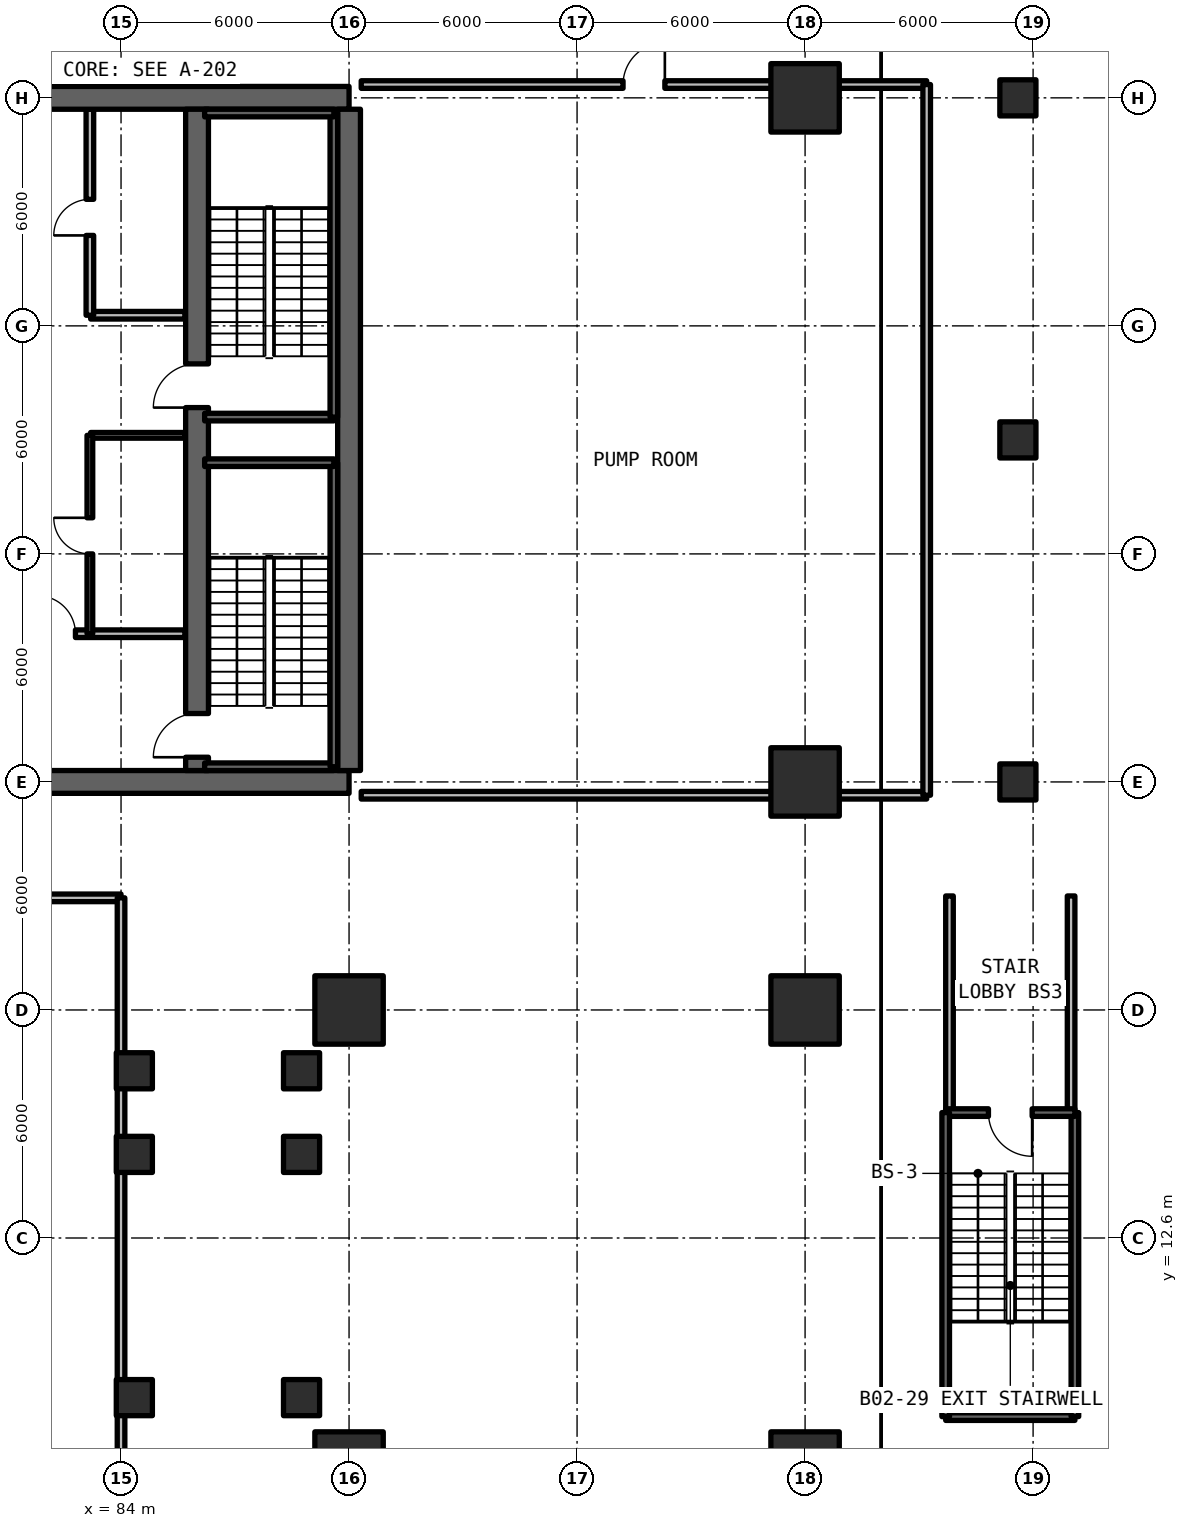
"""IFC4 building model, lengths in metres.
Left out: names, types, materials, properties, quantities, classifications, styles, units other than length and angle.
Written with IfcOpenShell. Run it as: python <this file> out.ifc"""

import sys

from ifc_helpers import new_model, si_unit, direction, frame, frame_2d, origin, origin_2d, place, context, subcontext, project, spatial, rectangle, extrude, element, fill, save


model = new_model("IFC4")
c1 = context("Model", 3, precision=1e-05, world=origin(), true_north=direction((0.0, 1.0)))
c2 = subcontext(c1, "Body", "Model", "MODEL_VIEW")
j1 = project(units=[si_unit("LENGTHUNIT", "METRE"), si_unit("PLANEANGLEUNIT", "RADIAN")], contexts=[c1])
p1 = place(None, origin())
s1 = spatial("IfcSite", under=j1, at=p1, CompositionType="ELEMENT")
p2 = place(p1, origin())
s2 = spatial("IfcBuilding", under=s1, at=p2, CompositionType="ELEMENT")
p3 = place(p2, frame((0.0, 0.0, -9.24)))
s3 = spatial("IfcBuildingStorey", under=s2, at=p3, CompositionType="ELEMENT", Elevation=-9.24)
for number, where, z_axis, x_axis in (
    (1, (78.0, 24.6, 0.0), (0.0, 0.0, 1.0), (1.0, 0.0, 0.0)),
    (2, (90.0, 42.6, 0.0), (0.0, 0.0, 1.0), (-1.0, 0.0, 0.0)),
):
    element("IfcWall", number, at=place(p3, frame(where, z_axis=z_axis, x_axis=x_axis)), inside=s3, PredefinedType="SHEAR", context=c2, shape_type="SweptSolid", body=[
        extrude(rectangle(XDim=12.0, YDim=0.6, at=frame_2d((6.0, 0.0))), origin(), (0.0, 0.0, 1.0), 4.62),
    ])
p4 = place(p3, frame((90.0, 24.9, 0.0), z_axis=(0.0, 0.0, 1.0), x_axis=(0.0, 1.0, 0.0)))
e3 = element("IfcWall", 3, at=p4, inside=s3, PredefinedType="SHEAR", context=c2, shape_type="SweptSolid", body=[
    extrude(rectangle(XDim=17.4, YDim=0.6, at=frame_2d((8.7, 0.0))), origin(), (0.0, 0.0, 1.0), 4.62),
])
p5 = place(p3, frame((86.0, 24.9, 0.0), z_axis=(0.0, 0.0, 1.0), x_axis=(0.0, 1.0, 0.0)))
e4 = element("IfcWall", 4, at=p5, inside=s3, PredefinedType="SHEAR", context=c2, shape_type="SweptSolid", body=[
    extrude(rectangle(XDim=17.4, YDim=0.6, at=frame_2d((8.7, 0.0))), origin(), (0.0, 0.0, 1.0), 4.62),
])
p6 = place(p5, frame((0.35, 0.0, 0.0)))
e5 = element("IfcOpeningElement", 5, at=p6, cuts=e4, PredefinedType="OPENING", context=c2, shape_type="SweptSolid", body=[
    extrude(rectangle(XDim=1.15, YDim=2.15, at=frame_2d((0.575, 1.075))), frame((0.0, 0.31, 0.0), z_axis=(0.0, -1.0, 0.0), x_axis=(1.0, 0.0, 0.0)), (0.0, 0.0, 1.0), 0.62),
])
p7 = place(p5, frame((9.55, 0.0, 0.0)))
e6 = element("IfcOpeningElement", 6, at=p7, cuts=e4, PredefinedType="OPENING", context=c2, shape_type="SweptSolid", body=[
    extrude(rectangle(XDim=1.15, YDim=2.15, at=frame_2d((0.575, 1.075))), frame((0.0, 0.31, 0.0), z_axis=(0.0, -1.0, 0.0), x_axis=(1.0, 0.0, 0.0)), (0.0, 0.0, 1.0), 0.62),
])
for number, where, z_axis, x_axis in (
    (7, (90.0, 6.6, 0.0), (0.0, 0.0, 1.0), (1.0, 0.0, 0.0)),
    (8, (102.0, 6.6, 0.0), (0.0, 0.0, 1.0), (1.0, 0.0, 0.0)),
    (9, (102.0, 24.6, 0.0), (0.0, 0.0, 1.0), (1.0, 0.0, 0.0)),
    (10, (102.0, 42.6, 0.0), (0.0, 0.0, 1.0), (1.0, 0.0, 0.0)),
    (11, (90.0, 18.6, 0.0), (0.0, 0.0, 1.0), (1.0, 0.0, 0.0)),
    (12, (102.0, 18.6, 0.0), (0.0, 0.0, 1.0), (1.0, 0.0, 0.0)),
):
    element("IfcColumn", number, at=place(p3, frame(where, z_axis=z_axis, x_axis=x_axis)), inside=s3, PredefinedType="COLUMN", context=c2, shape_type="SweptSolid", body=[
        extrude(rectangle(XDim=1.8, YDim=1.8, at=origin_2d()), origin(), (0.0, 0.0, 1.0), 4.62),
    ])
for number, where, z_axis, x_axis in (
    (13, (107.6, 24.6, 0.0), (0.0, 0.0, 1.0), (1.0, 0.0, 0.0)),
    (14, (107.6, 42.6, 0.0), (0.0, 0.0, 1.0), (1.0, 0.0, 0.0)),
    (15, (107.6, 33.6, 0.0), (0.0, 0.0, 1.0), (1.0, 0.0, 0.0)),
    (16, (84.35, 14.8, 0.0), (0.0, 0.0, 1.0), (1.0, 0.0, 0.0)),
    (17, (88.75, 14.8, 0.0), (0.0, 0.0, 1.0), (1.0, 0.0, 0.0)),
    (18, (84.35, 8.4, 0.0), (0.0, 0.0, 1.0), (1.0, 0.0, 0.0)),
    (19, (88.75, 8.4, 0.0), (0.0, 0.0, 1.0), (1.0, 0.0, 0.0)),
    (20, (88.75, 17.0, 0.0), (0.0, 0.0, 1.0), (1.0, 0.0, 0.0)),
    (21, (84.35, 17.0, 0.0), (0.0, 0.0, 1.0), (1.0, 0.0, 0.0)),
):
    element("IfcColumn", number, at=place(p3, frame(where, z_axis=z_axis, x_axis=x_axis)), inside=s3, PredefinedType="COLUMN", context=c2, shape_type="SweptSolid", body=[
        extrude(rectangle(XDim=0.95, YDim=0.95, at=origin_2d()), origin(), (0.0, 0.0, 1.0), 4.62),
    ])
p8 = place(p3, frame((78.32, 28.5, 0.0), z_axis=(0.0, 0.0, 1.0), x_axis=(1.0, 0.0, 0.0)))
e22 = element("IfcWall", 22, at=p8, inside=s3, PredefinedType="SOLIDWALL", context=c2, shape_type="SweptSolid", body=[
    extrude(rectangle(XDim=7.36, YDim=0.2, at=frame_2d((3.68, 0.0))), origin(), (0.0, 0.0, 1.0), 3.54),
])
p9 = place(p8, frame((3.48, 0.0, 0.0)))
e23 = element("IfcOpeningElement", 23, at=p9, cuts=e22, PredefinedType="OPENING", context=c2, shape_type="SweptSolid", body=[
    extrude(rectangle(XDim=1.0, YDim=2.15, at=frame_2d((0.5, 1.075))), frame((0.0, 0.11, 0.0), z_axis=(0.0, -1.0, 0.0), x_axis=(1.0, 0.0, 0.0)), (0.0, 0.0, 1.0), 0.22),
])
p10 = place(p3, frame((83.2, 33.72, 0.0), z_axis=(0.0, 0.0, 1.0), x_axis=(1.0, 0.0, 0.0)))
e24 = element("IfcWall", 24, at=p10, inside=s3, PredefinedType="SOLIDWALL", context=c2, shape_type="SweptSolid", body=[
    extrude(rectangle(XDim=2.48, YDim=0.15, at=frame_2d((1.24, 0.0))), origin(), (0.0, 0.0, 1.0), 3.54),
])
p11 = place(p3, frame((83.18, 28.5, 0.0), z_axis=(0.0, 0.0, 1.0), x_axis=(0.0, 1.0, 0.0)))
e25 = element("IfcWall", 25, at=p11, inside=s3, PredefinedType="SOLIDWALL", context=c2, shape_type="SweptSolid", body=[
    extrude(rectangle(XDim=5.22, YDim=0.15, at=frame_2d((2.61, 0.0))), origin(), (0.0, 0.0, 1.0), 3.54),
])
p12 = place(p11, frame((2.1, 0.0, 0.0)))
e26 = element("IfcOpeningElement", 26, at=p12, cuts=e25, PredefinedType="OPENING", context=c2, shape_type="SweptSolid", body=[
    extrude(rectangle(XDim=0.95, YDim=2.15, at=frame_2d((0.475, 1.075))), frame((0.0, 0.085, 0.0), z_axis=(0.0, -1.0, 0.0), x_axis=(1.0, 0.0, 0.0)), (0.0, 0.0, 1.0), 0.17),
])
p13 = place(p3, frame((83.2, 36.88, 0.0), z_axis=(0.0, 0.0, 1.0), x_axis=(1.0, 0.0, 0.0)))
e27 = element("IfcWall", 27, at=p13, inside=s3, PredefinedType="SOLIDWALL", context=c2, shape_type="SweptSolid", body=[
    extrude(rectangle(XDim=2.48, YDim=0.2, at=frame_2d((1.24, 0.0))), origin(), (0.0, 0.0, 1.0), 3.54),
])
p14 = place(p3, frame((83.18, 36.88, 0.0), z_axis=(0.0, 0.0, 1.0), x_axis=(0.0, 1.0, 0.0)))
e28 = element("IfcWall", 28, at=p14, inside=s3, PredefinedType="SOLIDWALL", context=c2, shape_type="SweptSolid", body=[
    extrude(rectangle(XDim=5.42, YDim=0.2, at=frame_2d((2.71, 0.0))), origin(), (0.0, 0.0, 1.0), 3.54),
])
p15 = place(p14, frame((2.1, 0.0, 0.0)))
e29 = element("IfcOpeningElement", 29, at=p15, cuts=e28, PredefinedType="OPENING", context=c2, shape_type="SweptSolid", body=[
    extrude(rectangle(XDim=0.95, YDim=2.15, at=frame_2d((0.475, 1.075))), frame((0.0, 0.11, 0.0), z_axis=(0.0, -1.0, 0.0), x_axis=(1.0, 0.0, 0.0)), (0.0, 0.0, 1.0), 0.22),
])
for number, where, z_axis, x_axis in (
    (30, (105.8, 15.9, 0.0), (0.0, 0.0, 1.0), (0.0, 1.0, 0.0)),
    (31, (109.0, 15.9, 0.0), (0.0, 0.0, 1.0), (0.0, 1.0, 0.0)),
):
    element("IfcWall", number, at=place(p3, frame(where, z_axis=z_axis, x_axis=x_axis)), inside=s3, PredefinedType="SOLIDWALL", context=c2, shape_type="SweptSolid", body=[
        extrude(rectangle(XDim=5.7, YDim=0.2, at=frame_2d((2.85, 0.0))), origin(), (0.0, 0.0, 1.0), 3.54),
    ])
p16 = place(p3, frame((30.2, 21.55, 0.0), z_axis=(0.0, 0.0, 1.0), x_axis=(1.0, 0.0, 0.0)))
e32 = element("IfcWall", 32, at=p16, inside=s3, PredefinedType="SOLIDWALL", context=c2, shape_type="SweptSolid", body=[
    extrude(rectangle(XDim=53.8, YDim=0.2, at=frame_2d((26.9, 0.0))), origin(), (0.0, 0.0, 1.0), 3.54),
])
p17 = place(p16, frame((26.45, 0.0, 0.0)))
e33 = element("IfcOpeningElement", 33, at=p17, cuts=e32, PredefinedType="OPENING", context=c2, shape_type="SweptSolid", body=[
    extrude(rectangle(XDim=1.1, YDim=2.15, at=frame_2d((0.55, 1.075))), frame((0.0, 0.11, 0.0), z_axis=(0.0, -1.0, 0.0), x_axis=(1.0, 0.0, 0.0)), (0.0, 0.0, 1.0), 0.22),
])
p18 = place(p3, frame((84.0, 0.45, 0.0), z_axis=(0.0, 0.0, 1.0), x_axis=(0.0, 1.0, 0.0)))
e34 = element("IfcWall", 34, at=p18, inside=s3, PredefinedType="SOLIDWALL", context=c2, shape_type="SweptSolid", body=[
    extrude(rectangle(XDim=21.1, YDim=0.2, at=frame_2d((10.55, 0.0))), origin(), (0.0, 0.0, 1.0), 3.54),
])
p19 = place(p3, frame((90.32, 24.25, 0.0), z_axis=(0.0, 0.0, 1.0), x_axis=(1.0, 0.0, 0.0)))
e35 = element("IfcWall", 35, at=p19, inside=s3, PredefinedType="SOLIDWALL", context=c2, shape_type="SweptSolid", body=[
    extrude(rectangle(XDim=14.88, YDim=0.2, at=frame_2d((7.44, 0.0))), origin(), (0.0, 0.0, 1.0), 3.54),
])
p20 = place(p3, frame((90.32, 42.95, 0.0), z_axis=(0.0, 0.0, 1.0), x_axis=(1.0, 0.0, 0.0)))
e36 = element("IfcWall", 36, at=p20, inside=s3, PredefinedType="SOLIDWALL", context=c2, shape_type="SweptSolid", body=[
    extrude(rectangle(XDim=14.88, YDim=0.2, at=frame_2d((7.44, 0.0))), origin(), (0.0, 0.0, 1.0), 3.54),
])
p21 = place(p20, frame((6.89, 0.0, 0.0)))
e37 = element("IfcOpeningElement", 37, at=p21, cuts=e36, PredefinedType="OPENING", context=c2, shape_type="SweptSolid", body=[
    extrude(rectangle(XDim=1.1, YDim=2.15, at=frame_2d((0.55, 1.075))), frame((0.0, 0.11, 0.0), z_axis=(0.0, -1.0, 0.0), x_axis=(1.0, 0.0, 0.0)), (0.0, 0.0, 1.0), 0.22),
])
p22 = place(p3, frame((105.2, 24.25, 0.0), z_axis=(0.0, 0.0, 1.0), x_axis=(0.0, 1.0, 0.0)))
e38 = element("IfcWall", 38, at=p22, inside=s3, PredefinedType="SOLIDWALL", context=c2, shape_type="SweptSolid", body=[
    extrude(rectangle(XDim=18.7, YDim=0.2, at=frame_2d((9.35, 0.0))), origin(), (0.0, 0.0, 1.0), 3.54),
])
p23 = place(p3, frame((86.2, 25.0, 0.0), z_axis=(0.0, 0.0, 1.0), x_axis=(1.0, 0.0, 0.0)))
e39 = element("IfcWall", 39, at=p23, inside=s3, PredefinedType="SOLIDWALL", context=c2, shape_type="SweptSolid", body=[
    extrude(rectangle(XDim=3.4, YDim=0.2, at=frame_2d((1.7, 0.0))), origin(), (0.0, 0.0, 1.0), 4.62),
])
p24 = place(p3, frame((89.6, 25.0, 0.0), z_axis=(0.0, 0.0, 1.0), x_axis=(0.0, 1.0, 0.0)))
e40 = element("IfcWall", 40, at=p24, inside=s3, PredefinedType="SOLIDWALL", context=c2, shape_type="SweptSolid", body=[
    extrude(rectangle(XDim=8.0, YDim=0.2, at=frame_2d((4.0, 0.0))), origin(), (0.0, 0.0, 1.0), 4.62),
])
for number, where, z_axis, x_axis in (
    (41, (89.6, 33.0, 0.0), (0.0, 0.0, 1.0), (-1.0, 0.0, 0.0)),
    (42, (86.2, 34.2, 0.0), (0.0, 0.0, 1.0), (1.0, 0.0, 0.0)),
):
    element("IfcWall", number, at=place(p3, frame(where, z_axis=z_axis, x_axis=x_axis)), inside=s3, PredefinedType="SOLIDWALL", context=c2, shape_type="SweptSolid", body=[
        extrude(rectangle(XDim=3.4, YDim=0.2, at=frame_2d((1.7, 0.0))), origin(), (0.0, 0.0, 1.0), 4.62),
    ])
p25 = place(p3, frame((89.6, 34.2, 0.0), z_axis=(0.0, 0.0, 1.0), x_axis=(0.0, 1.0, 0.0)))
e43 = element("IfcWall", 43, at=p25, inside=s3, PredefinedType="SOLIDWALL", context=c2, shape_type="SweptSolid", body=[
    extrude(rectangle(XDim=8.0, YDim=0.2, at=frame_2d((4.0, 0.0))), origin(), (0.0, 0.0, 1.0), 4.62),
])
for number, where, z_axis, x_axis in (
    (44, (89.6, 42.2, 0.0), (0.0, 0.0, 1.0), (-1.0, 0.0, 0.0)),
    (45, (105.7, 7.9, 0.0), (0.0, 0.0, 1.0), (1.0, 0.0, 0.0)),
):
    element("IfcWall", number, at=place(p3, frame(where, z_axis=z_axis, x_axis=x_axis)), inside=s3, PredefinedType="SOLIDWALL", context=c2, shape_type="SweptSolid", body=[
        extrude(rectangle(XDim=3.4, YDim=0.2, at=frame_2d((1.7, 0.0))), origin(), (0.0, 0.0, 1.0), 4.62),
    ])
p26 = place(p3, frame((109.1, 7.9, 0.0), z_axis=(0.0, 0.0, 1.0), x_axis=(0.0, 1.0, 0.0)))
e46 = element("IfcWall", 46, at=p26, inside=s3, PredefinedType="SOLIDWALL", context=c2, shape_type="SweptSolid", body=[
    extrude(rectangle(XDim=8.0, YDim=0.2, at=frame_2d((4.0, 0.0))), origin(), (0.0, 0.0, 1.0), 4.62),
])
p27 = place(p3, frame((109.1, 15.9, 0.0), z_axis=(0.0, 0.0, 1.0), x_axis=(-1.0, 0.0, 0.0)))
e47 = element("IfcWall", 47, at=p27, inside=s3, PredefinedType="SOLIDWALL", context=c2, shape_type="SweptSolid", body=[
    extrude(rectangle(XDim=3.4, YDim=0.2, at=frame_2d((1.7, 0.0))), origin(), (0.0, 0.0, 1.0), 4.62),
])
p28 = place(p27, frame((1.125, 0.0, 0.0)))
e48 = element("IfcOpeningElement", 48, at=p28, cuts=e47, PredefinedType="OPENING", context=c2, shape_type="SweptSolid", body=[
    extrude(rectangle(XDim=1.15, YDim=2.15, at=frame_2d((0.575, 1.075))), frame((0.0, 0.11, 0.0), z_axis=(0.0, -1.0, 0.0), x_axis=(1.0, 0.0, 0.0)), (0.0, 0.0, 1.0), 0.22),
])
p29 = place(p3, frame((105.7, 15.9, 0.0), z_axis=(0.0, 0.0, 1.0), x_axis=(0.0, -1.0, 0.0)))
e49 = element("IfcWall", 49, at=p29, inside=s3, PredefinedType="SOLIDWALL", context=c2, shape_type="SweptSolid", body=[
    extrude(rectangle(XDim=8.0, YDim=0.2, at=frame_2d((4.0, 0.0))), origin(), (0.0, 0.0, 1.0), 4.62),
])
p30 = place(p9, origin())
e50 = element("IfcDoor", 50, at=p30, inside=s3, OperationType="SINGLE_SWING_LEFT", PredefinedType="DOOR", context=c2, shape_type="SweptSolid", body=[
    extrude(rectangle(XDim=1.0, YDim=2.15, at=frame_2d((0.5, 1.075))), frame((0.0, 0.025, 0.0), z_axis=(0.0, -1.0, 0.0), x_axis=(1.0, 0.0, 0.0)), (0.0, 0.0, 1.0), 0.05),
])
fill(e23, e50)
p31 = place(p12, origin())
e51 = element("IfcDoor", 51, at=p31, inside=s3, OperationType="SINGLE_SWING_RIGHT", PredefinedType="DOOR", context=c2, shape_type="SweptSolid", body=[
    extrude(rectangle(XDim=0.95, YDim=2.15, at=frame_2d((0.475, 1.075))), frame((0.0, 0.025, 0.0), z_axis=(0.0, -1.0, 0.0), x_axis=(1.0, 0.0, 0.0)), (0.0, 0.0, 1.0), 0.05),
])
fill(e26, e51)
p32 = place(p15, origin())
e52 = element("IfcDoor", 52, at=p32, inside=s3, OperationType="SINGLE_SWING_LEFT", PredefinedType="DOOR", context=c2, shape_type="SweptSolid", body=[
    extrude(rectangle(XDim=0.95, YDim=2.15, at=frame_2d((0.475, 1.075))), frame((0.0, 0.025, 0.0), z_axis=(0.0, -1.0, 0.0), x_axis=(1.0, 0.0, 0.0)), (0.0, 0.0, 1.0), 0.05),
])
fill(e29, e52)
p33 = place(p21, origin())
e53 = element("IfcDoor", 53, at=p33, inside=s3, OperationType="SINGLE_SWING_RIGHT", PredefinedType="DOOR", context=c2, shape_type="SweptSolid", body=[
    extrude(rectangle(XDim=1.1, YDim=2.15, at=frame_2d((0.55, 1.075))), frame((0.0, 0.025, 0.0), z_axis=(0.0, -1.0, 0.0), x_axis=(1.0, 0.0, 0.0)), (0.0, 0.0, 1.0), 0.05),
])
fill(e37, e53)
p34 = place(p6, origin())
e54 = element("IfcDoor", 54, at=p34, inside=s3, OperationType="SINGLE_SWING_LEFT", PredefinedType="DOOR", context=c2, shape_type="SweptSolid", body=[
    extrude(rectangle(XDim=1.15, YDim=2.15, at=frame_2d((0.575, 1.075))), frame((0.0, 0.025, 0.0), z_axis=(0.0, -1.0, 0.0), x_axis=(1.0, 0.0, 0.0)), (0.0, 0.0, 1.0), 0.05),
])
fill(e5, e54)
p35 = place(p7, origin())
e55 = element("IfcDoor", 55, at=p35, inside=s3, OperationType="SINGLE_SWING_RIGHT", PredefinedType="DOOR", context=c2, shape_type="SweptSolid", body=[
    extrude(rectangle(XDim=1.15, YDim=2.15, at=frame_2d((0.575, 1.075))), frame((0.0, 0.025, 0.0), z_axis=(0.0, -1.0, 0.0), x_axis=(1.0, 0.0, 0.0)), (0.0, 0.0, 1.0), 0.05),
])
fill(e6, e55)
p36 = place(p28, origin())
e56 = element("IfcDoor", 56, at=p36, inside=s3, OperationType="SINGLE_SWING_LEFT", PredefinedType="DOOR", context=c2, shape_type="SweptSolid", body=[
    extrude(rectangle(XDim=1.15, YDim=2.15, at=frame_2d((0.575, 1.075))), frame((0.0, 0.025, 0.0), z_axis=(0.0, -1.0, 0.0), x_axis=(1.0, 0.0, 0.0)), (0.0, 0.0, 1.0), 0.05),
])
fill(e48, e56)
save(model, sys.argv[1])
